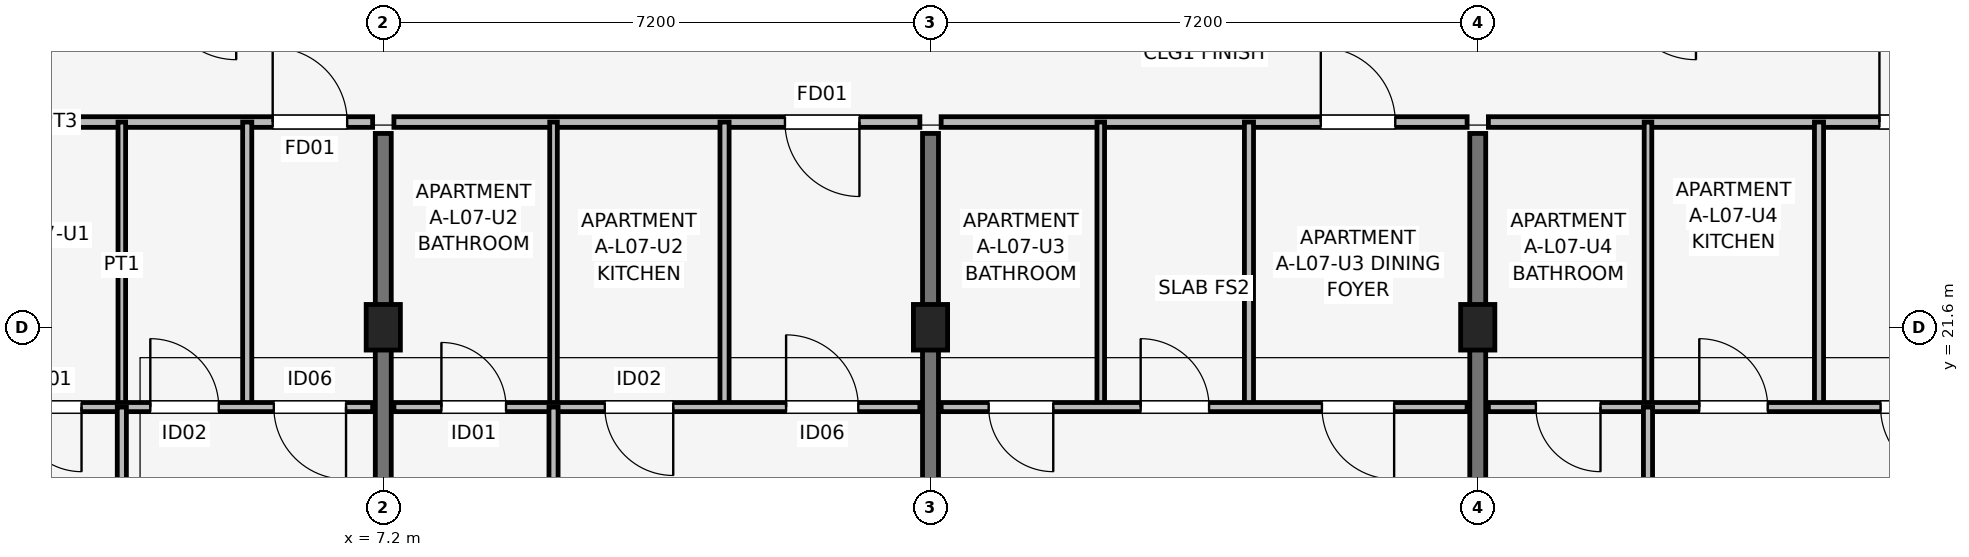
"""IFC4 building model, lengths in metres.
Left out: names, types, materials, properties, quantities, classifications, styles, units other than length and angle.
Written with IfcOpenShell. Run it as: python <this file> out.ifc"""

import sys

from ifc_helpers import new_model, si_unit, direction, frame, frame_2d, origin, origin_2d, place, context, subcontext, project, spatial, rectangle, extrude, element, fill, save


model = new_model("IFC4")
c1 = context("Model", 3, precision=1e-05, world=origin(), true_north=direction((0.0, 1.0)))
c2 = subcontext(c1, "Body", "Model", "MODEL_VIEW")
j1 = project(units=[si_unit("LENGTHUNIT", "METRE"), si_unit("PLANEANGLEUNIT", "RADIAN")], contexts=[c1])
p1 = place(None, origin())
s1 = spatial("IfcSite", under=j1, at=p1, CompositionType="ELEMENT")
p2 = place(p1, origin())
s2 = spatial("IfcBuilding", under=s1, at=p2, CompositionType="ELEMENT")
p3 = place(p2, frame((0.0, 0.0, 24.45)))
s3 = spatial("IfcBuildingStorey", under=s2, at=p3, CompositionType="ELEMENT", Elevation=24.45)
for number, where, z_axis, x_axis in (
    (1, (7.2, 21.6, 0.0), (0.0, 0.0, 1.0), (1.0, 0.0, 0.0)),
    (2, (14.4, 21.6, 0.0), (0.0, 0.0, 1.0), (1.0, 0.0, 0.0)),
    (3, (21.6, 21.6, 0.0), (0.0, 0.0, 1.0), (1.0, 0.0, 0.0)),
):
    element("IfcColumn", number, at=place(p3, frame(where, z_axis=z_axis, x_axis=x_axis)), inside=s3, PredefinedType="COLUMN", context=c2, shape_type="SweptSolid", body=[
        extrude(rectangle(XDim=0.45, YDim=0.6, at=origin_2d()), origin(), (0.0, 0.0, 1.0), 3.15),
    ])
for number, where, z_axis, x_axis in (
    (4, (7.2, 14.75, 0.0), (0.0, 0.0, 1.0), (0.0, 1.0, 0.0)),
    (5, (14.4, 14.75, 0.0), (0.0, 0.0, 1.0), (0.0, 1.0, 0.0)),
    (6, (21.6, 14.75, 0.0), (0.0, 0.0, 1.0), (0.0, 1.0, 0.0)),
):
    element("IfcWall", number, at=place(p3, frame(where, z_axis=z_axis, x_axis=x_axis)), inside=s3, PredefinedType="SHEAR", context=c2, shape_type="SweptSolid", body=[
        extrude(rectangle(XDim=9.4, YDim=0.21, at=frame_2d((4.7, 0.0))), origin(), (0.0, 0.0, 1.0), 3.15),
    ])
p4 = place(p3, frame((0.14, 24.3, 0.0), z_axis=(0.0, 0.0, 1.0), x_axis=(1.0, 0.0, 0.0)))
e7 = element("IfcWall", 7, at=p4, inside=s3, PredefinedType="PARTITIONING", context=c2, shape_type="SweptSolid", body=[
    extrude(rectangle(XDim=6.92, YDim=0.14, at=frame_2d((3.46, 0.0))), origin(), (0.0, 0.0, 1.0), 2.38),
])
p5 = place(p4, frame((5.605, 0.0, 0.0)))
e8 = element("IfcOpeningElement", 8, at=p5, cuts=e7, PredefinedType="OPENING", context=c2, shape_type="SweptSolid", body=[
    extrude(rectangle(XDim=0.98, YDim=2.1, at=frame_2d((0.49, 1.05))), frame((0.0, 0.08, 0.0), z_axis=(0.0, -1.0, 0.0), x_axis=(1.0, 0.0, 0.0)), (0.0, 0.0, 1.0), 0.16),
])
p6 = place(p3, frame((3.76, 20.55, 0.0), z_axis=(0.0, 0.0, 1.0), x_axis=(0.0, 1.0, 0.0)))
e9 = element("IfcWall", 9, at=p6, inside=s3, PredefinedType="PARTITIONING", context=c2, shape_type="SweptSolid", body=[
    extrude(rectangle(XDim=3.75, YDim=0.1, at=frame_2d((1.875, 0.0))), origin(), (0.0, 0.0, 1.0), 2.38),
])
p7 = place(p3, frame((5.41, 20.55, 0.0), z_axis=(0.0, 0.0, 1.0), x_axis=(0.0, 1.0, 0.0)))
e10 = element("IfcWall", 10, at=p7, inside=s3, PredefinedType="PARTITIONING", context=c2, shape_type="SweptSolid", body=[
    extrude(rectangle(XDim=3.75, YDim=0.12, at=frame_2d((1.875, 0.0))), origin(), (0.0, 0.0, 1.0), 2.38),
])
p8 = place(p3, frame((0.14, 20.55, 0.0), z_axis=(0.0, 0.0, 1.0), x_axis=(1.0, 0.0, 0.0)))
e11 = element("IfcWall", 11, at=p8, inside=s3, PredefinedType="PARTITIONING", context=c2, shape_type="SweptSolid", body=[
    extrude(rectangle(XDim=6.92, YDim=0.12, at=frame_2d((3.46, 0.0))), origin(), (0.0, 0.0, 1.0), 2.38),
])
p9 = place(p8, frame((3.09, 0.0, 0.0), z_axis=(0.0, 0.0, 1.0), x_axis=(-1.0, 0.0, 0.0)))
e12 = element("IfcOpeningElement", 12, at=p9, cuts=e11, PredefinedType="OPENING", context=c2, shape_type="SweptSolid", body=[
    extrude(rectangle(XDim=0.85, YDim=2.08, at=frame_2d((0.425, 1.04))), frame((0.0, 0.07, 0.0), z_axis=(0.0, -1.0, 0.0), x_axis=(1.0, 0.0, 0.0)), (0.0, 0.0, 1.0), 0.14),
])
p10 = place(p8, frame((3.995, 0.0, 0.0)))
e13 = element("IfcOpeningElement", 13, at=p10, cuts=e11, PredefinedType="OPENING", context=c2, shape_type="SweptSolid", body=[
    extrude(rectangle(XDim=0.9, YDim=2.08, at=frame_2d((0.45, 1.04))), frame((0.0, 0.07, 0.0), z_axis=(0.0, -1.0, 0.0), x_axis=(1.0, 0.0, 0.0)), (0.0, 0.0, 1.0), 0.14),
])
p11 = place(p8, frame((6.57, 0.0, 0.0), z_axis=(0.0, 0.0, 1.0), x_axis=(-1.0, 0.0, 0.0)))
e14 = element("IfcOpeningElement", 14, at=p11, cuts=e11, PredefinedType="OPENING", context=c2, shape_type="SweptSolid", body=[
    extrude(rectangle(XDim=0.95, YDim=2.08, at=frame_2d((0.475, 1.04))), frame((0.0, 0.07, 0.0), z_axis=(0.0, -1.0, 0.0), x_axis=(1.0, 0.0, 0.0)), (0.0, 0.0, 1.0), 0.14),
])
p12 = place(p3, frame((3.76, 14.7, 0.0), z_axis=(0.0, 0.0, 1.0), x_axis=(0.0, 1.0, 0.0)))
e15 = element("IfcWall", 15, at=p12, inside=s3, PredefinedType="PARTITIONING", context=c2, shape_type="SweptSolid", body=[
    extrude(rectangle(XDim=5.85, YDim=0.12, at=frame_2d((2.925, 0.0))), origin(), (0.0, 0.0, 1.0), 2.38),
])
p13 = place(p12, frame((2.475, 0.0, 0.0)))
e16 = element("IfcOpeningElement", 16, at=p13, cuts=e15, PredefinedType="OPENING", context=c2, shape_type="SweptSolid", body=[
    extrude(rectangle(XDim=0.9, YDim=2.08, at=frame_2d((0.45, 1.04))), frame((0.0, 0.07, 0.0), z_axis=(0.0, -1.0, 0.0), x_axis=(1.0, 0.0, 0.0)), (0.0, 0.0, 1.0), 0.14),
])
p14 = place(p3, frame((7.34, 24.3, 0.0), z_axis=(0.0, 0.0, 1.0), x_axis=(1.0, 0.0, 0.0)))
e17 = element("IfcWall", 17, at=p14, inside=s3, PredefinedType="PARTITIONING", context=c2, shape_type="SweptSolid", body=[
    extrude(rectangle(XDim=6.92, YDim=0.14, at=frame_2d((3.46, 0.0))), origin(), (0.0, 0.0, 1.0), 2.38),
])
p15 = place(p14, frame((6.125, 0.0, 0.0), z_axis=(0.0, 0.0, 1.0), x_axis=(-1.0, 0.0, 0.0)))
e18 = element("IfcOpeningElement", 18, at=p15, cuts=e17, PredefinedType="OPENING", context=c2, shape_type="SweptSolid", body=[
    extrude(rectangle(XDim=0.98, YDim=2.1, at=frame_2d((0.49, 1.05))), frame((0.0, 0.08, 0.0), z_axis=(0.0, -1.0, 0.0), x_axis=(1.0, 0.0, 0.0)), (0.0, 0.0, 1.0), 0.16),
])
p16 = place(p3, frame((9.44, 20.55, 0.0), z_axis=(0.0, 0.0, 1.0), x_axis=(0.0, 1.0, 0.0)))
e19 = element("IfcWall", 19, at=p16, inside=s3, PredefinedType="PARTITIONING", context=c2, shape_type="SweptSolid", body=[
    extrude(rectangle(XDim=3.75, YDim=0.1, at=frame_2d((1.875, 0.0))), origin(), (0.0, 0.0, 1.0), 2.38),
])
p17 = place(p3, frame((11.69, 20.55, 0.0), z_axis=(0.0, 0.0, 1.0), x_axis=(0.0, 1.0, 0.0)))
e20 = element("IfcWall", 20, at=p17, inside=s3, PredefinedType="PARTITIONING", context=c2, shape_type="SweptSolid", body=[
    extrude(rectangle(XDim=3.75, YDim=0.12, at=frame_2d((1.875, 0.0))), origin(), (0.0, 0.0, 1.0), 2.38),
])
p18 = place(p3, frame((7.34, 20.55, 0.0), z_axis=(0.0, 0.0, 1.0), x_axis=(1.0, 0.0, 0.0)))
e21 = element("IfcWall", 21, at=p18, inside=s3, PredefinedType="PARTITIONING", context=c2, shape_type="SweptSolid", body=[
    extrude(rectangle(XDim=6.92, YDim=0.12, at=frame_2d((3.46, 0.0))), origin(), (0.0, 0.0, 1.0), 2.38),
])
p19 = place(p18, frame((0.625, 0.0, 0.0)))
e22 = element("IfcOpeningElement", 22, at=p19, cuts=e21, PredefinedType="OPENING", context=c2, shape_type="SweptSolid", body=[
    extrude(rectangle(XDim=0.85, YDim=2.08, at=frame_2d((0.425, 1.04))), frame((0.0, 0.07, 0.0), z_axis=(0.0, -1.0, 0.0), x_axis=(1.0, 0.0, 0.0)), (0.0, 0.0, 1.0), 0.14),
])
p20 = place(p18, frame((3.675, 0.0, 0.0), z_axis=(0.0, 0.0, 1.0), x_axis=(-1.0, 0.0, 0.0)))
e23 = element("IfcOpeningElement", 23, at=p20, cuts=e21, PredefinedType="OPENING", context=c2, shape_type="SweptSolid", body=[
    extrude(rectangle(XDim=0.9, YDim=2.08, at=frame_2d((0.45, 1.04))), frame((0.0, 0.07, 0.0), z_axis=(0.0, -1.0, 0.0), x_axis=(1.0, 0.0, 0.0)), (0.0, 0.0, 1.0), 0.14),
])
p21 = place(p18, frame((5.16, 0.0, 0.0)))
e24 = element("IfcOpeningElement", 24, at=p21, cuts=e21, PredefinedType="OPENING", context=c2, shape_type="SweptSolid", body=[
    extrude(rectangle(XDim=0.95, YDim=2.08, at=frame_2d((0.475, 1.04))), frame((0.0, 0.07, 0.0), z_axis=(0.0, -1.0, 0.0), x_axis=(1.0, 0.0, 0.0)), (0.0, 0.0, 1.0), 0.14),
])
p22 = place(p3, frame((9.44, 14.7, 0.0), z_axis=(0.0, 0.0, 1.0), x_axis=(0.0, 1.0, 0.0)))
e25 = element("IfcWall", 25, at=p22, inside=s3, PredefinedType="PARTITIONING", context=c2, shape_type="SweptSolid", body=[
    extrude(rectangle(XDim=5.85, YDim=0.12, at=frame_2d((2.925, 0.0))), origin(), (0.0, 0.0, 1.0), 2.38),
])
p23 = place(p22, frame((3.375, 0.0, 0.0), z_axis=(0.0, 0.0, 1.0), x_axis=(-1.0, 0.0, 0.0)))
e26 = element("IfcOpeningElement", 26, at=p23, cuts=e25, PredefinedType="OPENING", context=c2, shape_type="SweptSolid", body=[
    extrude(rectangle(XDim=0.9, YDim=2.08, at=frame_2d((0.45, 1.04))), frame((0.0, 0.07, 0.0), z_axis=(0.0, -1.0, 0.0), x_axis=(1.0, 0.0, 0.0)), (0.0, 0.0, 1.0), 0.14),
])
p24 = place(p3, frame((14.54, 24.3, 0.0), z_axis=(0.0, 0.0, 1.0), x_axis=(1.0, 0.0, 0.0)))
e27 = element("IfcWall", 27, at=p24, inside=s3, PredefinedType="PARTITIONING", context=c2, shape_type="SweptSolid", body=[
    extrude(rectangle(XDim=6.92, YDim=0.14, at=frame_2d((3.46, 0.0))), origin(), (0.0, 0.0, 1.0), 2.38),
])
p25 = place(p24, frame((4.995, 0.0, 0.0)))
e28 = element("IfcOpeningElement", 28, at=p25, cuts=e27, PredefinedType="OPENING", context=c2, shape_type="SweptSolid", body=[
    extrude(rectangle(XDim=0.98, YDim=2.1, at=frame_2d((0.49, 1.05))), frame((0.0, 0.08, 0.0), z_axis=(0.0, -1.0, 0.0), x_axis=(1.0, 0.0, 0.0)), (0.0, 0.0, 1.0), 0.16),
])
p26 = place(p3, frame((16.64, 20.55, 0.0), z_axis=(0.0, 0.0, 1.0), x_axis=(0.0, 1.0, 0.0)))
e29 = element("IfcWall", 29, at=p26, inside=s3, PredefinedType="PARTITIONING", context=c2, shape_type="SweptSolid", body=[
    extrude(rectangle(XDim=3.75, YDim=0.1, at=frame_2d((1.875, 0.0))), origin(), (0.0, 0.0, 1.0), 2.38),
])
p27 = place(p3, frame((18.59, 20.55, 0.0), z_axis=(0.0, 0.0, 1.0), x_axis=(0.0, 1.0, 0.0)))
e30 = element("IfcWall", 30, at=p27, inside=s3, PredefinedType="PARTITIONING", context=c2, shape_type="SweptSolid", body=[
    extrude(rectangle(XDim=3.75, YDim=0.12, at=frame_2d((1.875, 0.0))), origin(), (0.0, 0.0, 1.0), 2.38),
])
p28 = place(p3, frame((14.54, 20.55, 0.0), z_axis=(0.0, 0.0, 1.0), x_axis=(1.0, 0.0, 0.0)))
e31 = element("IfcWall", 31, at=p28, inside=s3, PredefinedType="PARTITIONING", context=c2, shape_type="SweptSolid", body=[
    extrude(rectangle(XDim=6.92, YDim=0.12, at=frame_2d((3.46, 0.0))), origin(), (0.0, 0.0, 1.0), 2.38),
])
p29 = place(p28, frame((1.475, 0.0, 0.0), z_axis=(0.0, 0.0, 1.0), x_axis=(-1.0, 0.0, 0.0)))
e32 = element("IfcOpeningElement", 32, at=p29, cuts=e31, PredefinedType="OPENING", context=c2, shape_type="SweptSolid", body=[
    extrude(rectangle(XDim=0.85, YDim=2.08, at=frame_2d((0.425, 1.04))), frame((0.0, 0.07, 0.0), z_axis=(0.0, -1.0, 0.0), x_axis=(1.0, 0.0, 0.0)), (0.0, 0.0, 1.0), 0.14),
])
p30 = place(p28, frame((2.625, 0.0, 0.0)))
e33 = element("IfcOpeningElement", 33, at=p30, cuts=e31, PredefinedType="OPENING", context=c2, shape_type="SweptSolid", body=[
    extrude(rectangle(XDim=0.9, YDim=2.08, at=frame_2d((0.45, 1.04))), frame((0.0, 0.07, 0.0), z_axis=(0.0, -1.0, 0.0), x_axis=(1.0, 0.0, 0.0)), (0.0, 0.0, 1.0), 0.14),
])
p31 = place(p28, frame((5.96, 0.0, 0.0), z_axis=(0.0, 0.0, 1.0), x_axis=(-1.0, 0.0, 0.0)))
e34 = element("IfcOpeningElement", 34, at=p31, cuts=e31, PredefinedType="OPENING", context=c2, shape_type="SweptSolid", body=[
    extrude(rectangle(XDim=0.95, YDim=2.08, at=frame_2d((0.475, 1.04))), frame((0.0, 0.07, 0.0), z_axis=(0.0, -1.0, 0.0), x_axis=(1.0, 0.0, 0.0)), (0.0, 0.0, 1.0), 0.14),
])
p32 = place(p3, frame((21.74, 24.3, 0.0), z_axis=(0.0, 0.0, 1.0), x_axis=(1.0, 0.0, 0.0)))
e35 = element("IfcWall", 35, at=p32, inside=s3, PredefinedType="PARTITIONING", context=c2, shape_type="SweptSolid", body=[
    extrude(rectangle(XDim=6.92, YDim=0.14, at=frame_2d((3.46, 0.0))), origin(), (0.0, 0.0, 1.0), 2.38),
])
p33 = place(p32, frame((5.145, 0.0, 0.0)))
e36 = element("IfcOpeningElement", 36, at=p33, cuts=e35, PredefinedType="OPENING", context=c2, shape_type="SweptSolid", body=[
    extrude(rectangle(XDim=0.98, YDim=2.1, at=frame_2d((0.49, 1.05))), frame((0.0, 0.08, 0.0), z_axis=(0.0, -1.0, 0.0), x_axis=(1.0, 0.0, 0.0)), (0.0, 0.0, 1.0), 0.16),
])
p34 = place(p3, frame((23.84, 20.55, 0.0), z_axis=(0.0, 0.0, 1.0), x_axis=(0.0, 1.0, 0.0)))
e37 = element("IfcWall", 37, at=p34, inside=s3, PredefinedType="PARTITIONING", context=c2, shape_type="SweptSolid", body=[
    extrude(rectangle(XDim=3.75, YDim=0.1, at=frame_2d((1.875, 0.0))), origin(), (0.0, 0.0, 1.0), 2.38),
])
p35 = place(p3, frame((26.09, 20.55, 0.0), z_axis=(0.0, 0.0, 1.0), x_axis=(0.0, 1.0, 0.0)))
e38 = element("IfcWall", 38, at=p35, inside=s3, PredefinedType="PARTITIONING", context=c2, shape_type="SweptSolid", body=[
    extrude(rectangle(XDim=3.75, YDim=0.12, at=frame_2d((1.875, 0.0))), origin(), (0.0, 0.0, 1.0), 2.38),
])
p36 = place(p3, frame((21.74, 20.55, 0.0), z_axis=(0.0, 0.0, 1.0), x_axis=(1.0, 0.0, 0.0)))
e39 = element("IfcWall", 39, at=p36, inside=s3, PredefinedType="PARTITIONING", context=c2, shape_type="SweptSolid", body=[
    extrude(rectangle(XDim=6.92, YDim=0.12, at=frame_2d((3.46, 0.0))), origin(), (0.0, 0.0, 1.0), 2.38),
])
p37 = place(p36, frame((1.475, 0.0, 0.0), z_axis=(0.0, 0.0, 1.0), x_axis=(-1.0, 0.0, 0.0)))
e40 = element("IfcOpeningElement", 40, at=p37, cuts=e39, PredefinedType="OPENING", context=c2, shape_type="SweptSolid", body=[
    extrude(rectangle(XDim=0.85, YDim=2.08, at=frame_2d((0.425, 1.04))), frame((0.0, 0.07, 0.0), z_axis=(0.0, -1.0, 0.0), x_axis=(1.0, 0.0, 0.0)), (0.0, 0.0, 1.0), 0.14),
])
p38 = place(p36, frame((2.775, 0.0, 0.0)))
e41 = element("IfcOpeningElement", 41, at=p38, cuts=e39, PredefinedType="OPENING", context=c2, shape_type="SweptSolid", body=[
    extrude(rectangle(XDim=0.9, YDim=2.08, at=frame_2d((0.45, 1.04))), frame((0.0, 0.07, 0.0), z_axis=(0.0, -1.0, 0.0), x_axis=(1.0, 0.0, 0.0)), (0.0, 0.0, 1.0), 0.14),
])
p39 = place(p36, frame((6.11, 0.0, 0.0), z_axis=(0.0, 0.0, 1.0), x_axis=(-1.0, 0.0, 0.0)))
e42 = element("IfcOpeningElement", 42, at=p39, cuts=e39, PredefinedType="OPENING", context=c2, shape_type="SweptSolid", body=[
    extrude(rectangle(XDim=0.95, YDim=2.08, at=frame_2d((0.475, 1.04))), frame((0.0, 0.07, 0.0), z_axis=(0.0, -1.0, 0.0), x_axis=(1.0, 0.0, 0.0)), (0.0, 0.0, 1.0), 0.14),
])
p40 = place(p3, frame((23.84, 14.7, 0.0), z_axis=(0.0, 0.0, 1.0), x_axis=(0.0, 1.0, 0.0)))
e43 = element("IfcWall", 43, at=p40, inside=s3, PredefinedType="PARTITIONING", context=c2, shape_type="SweptSolid", body=[
    extrude(rectangle(XDim=5.85, YDim=0.12, at=frame_2d((2.925, 0.0))), origin(), (0.0, 0.0, 1.0), 2.38),
])
p41 = place(p40, frame((2.475, 0.0, 0.0)))
e44 = element("IfcOpeningElement", 44, at=p41, cuts=e43, PredefinedType="OPENING", context=c2, shape_type="SweptSolid", body=[
    extrude(rectangle(XDim=0.9, YDim=2.08, at=frame_2d((0.45, 1.04))), frame((0.0, 0.07, 0.0), z_axis=(0.0, -1.0, 0.0), x_axis=(1.0, 0.0, 0.0)), (0.0, 0.0, 1.0), 0.14),
])
p42 = place(p5, origin())
e45 = element("IfcDoor", 45, at=p42, inside=s3, OperationType="SINGLE_SWING_LEFT", PredefinedType="DOOR", context=c2, shape_type="SweptSolid", body=[
    extrude(rectangle(XDim=0.98, YDim=2.1, at=frame_2d((0.49, 1.05))), frame((0.0, 0.025, 0.0), z_axis=(0.0, -1.0, 0.0), x_axis=(1.0, 0.0, 0.0)), (0.0, 0.0, 1.0), 0.05),
])
fill(e8, e45)
p43 = place(p9, origin())
e46 = element("IfcDoor", 46, at=p43, inside=s3, OperationType="SINGLE_SWING_RIGHT", PredefinedType="DOOR", context=c2, shape_type="SweptSolid", body=[
    extrude(rectangle(XDim=0.85, YDim=2.08, at=frame_2d((0.425, 1.04))), frame((0.0, 0.025, 0.0), z_axis=(0.0, -1.0, 0.0), x_axis=(1.0, 0.0, 0.0)), (0.0, 0.0, 1.0), 0.05),
])
fill(e12, e46)
p44 = place(p10, origin())
e47 = element("IfcDoor", 47, at=p44, inside=s3, OperationType="SINGLE_SWING_LEFT", PredefinedType="DOOR", context=c2, shape_type="SweptSolid", body=[
    extrude(rectangle(XDim=0.9, YDim=2.08, at=frame_2d((0.45, 1.04))), frame((0.0, 0.025, 0.0), z_axis=(0.0, -1.0, 0.0), x_axis=(1.0, 0.0, 0.0)), (0.0, 0.0, 1.0), 0.05),
])
fill(e13, e47)
p45 = place(p11, origin())
e48 = element("IfcDoor", 48, at=p45, inside=s3, OperationType="SINGLE_SWING_RIGHT", PredefinedType="DOOR", context=c2, shape_type="SweptSolid", body=[
    extrude(rectangle(XDim=0.95, YDim=2.08, at=frame_2d((0.475, 1.04))), frame((0.0, 0.025, 0.0), z_axis=(0.0, -1.0, 0.0), x_axis=(1.0, 0.0, 0.0)), (0.0, 0.0, 1.0), 0.05),
])
fill(e14, e48)
p46 = place(p15, origin())
e49 = element("IfcDoor", 49, at=p46, inside=s3, OperationType="SINGLE_SWING_RIGHT", PredefinedType="DOOR", context=c2, shape_type="SweptSolid", body=[
    extrude(rectangle(XDim=0.98, YDim=2.1, at=frame_2d((0.49, 1.05))), frame((0.0, 0.025, 0.0), z_axis=(0.0, -1.0, 0.0), x_axis=(1.0, 0.0, 0.0)), (0.0, 0.0, 1.0), 0.05),
])
fill(e18, e49)
p47 = place(p19, origin())
e50 = element("IfcDoor", 50, at=p47, inside=s3, OperationType="SINGLE_SWING_LEFT", PredefinedType="DOOR", context=c2, shape_type="SweptSolid", body=[
    extrude(rectangle(XDim=0.85, YDim=2.08, at=frame_2d((0.425, 1.04))), frame((0.0, 0.025, 0.0), z_axis=(0.0, -1.0, 0.0), x_axis=(1.0, 0.0, 0.0)), (0.0, 0.0, 1.0), 0.05),
])
fill(e22, e50)
p48 = place(p20, origin())
e51 = element("IfcDoor", 51, at=p48, inside=s3, OperationType="SINGLE_SWING_RIGHT", PredefinedType="DOOR", context=c2, shape_type="SweptSolid", body=[
    extrude(rectangle(XDim=0.9, YDim=2.08, at=frame_2d((0.45, 1.04))), frame((0.0, 0.025, 0.0), z_axis=(0.0, -1.0, 0.0), x_axis=(1.0, 0.0, 0.0)), (0.0, 0.0, 1.0), 0.05),
])
fill(e23, e51)
p49 = place(p21, origin())
e52 = element("IfcDoor", 52, at=p49, inside=s3, OperationType="SINGLE_SWING_LEFT", PredefinedType="DOOR", context=c2, shape_type="SweptSolid", body=[
    extrude(rectangle(XDim=0.95, YDim=2.08, at=frame_2d((0.475, 1.04))), frame((0.0, 0.025, 0.0), z_axis=(0.0, -1.0, 0.0), x_axis=(1.0, 0.0, 0.0)), (0.0, 0.0, 1.0), 0.05),
])
fill(e24, e52)
p50 = place(p25, origin())
e53 = element("IfcDoor", 53, at=p50, inside=s3, OperationType="SINGLE_SWING_LEFT", PredefinedType="DOOR", context=c2, shape_type="SweptSolid", body=[
    extrude(rectangle(XDim=0.98, YDim=2.1, at=frame_2d((0.49, 1.05))), frame((0.0, 0.025, 0.0), z_axis=(0.0, -1.0, 0.0), x_axis=(1.0, 0.0, 0.0)), (0.0, 0.0, 1.0), 0.05),
])
fill(e28, e53)
p51 = place(p29, origin())
e54 = element("IfcDoor", 54, at=p51, inside=s3, OperationType="SINGLE_SWING_RIGHT", PredefinedType="DOOR", context=c2, shape_type="SweptSolid", body=[
    extrude(rectangle(XDim=0.85, YDim=2.08, at=frame_2d((0.425, 1.04))), frame((0.0, 0.025, 0.0), z_axis=(0.0, -1.0, 0.0), x_axis=(1.0, 0.0, 0.0)), (0.0, 0.0, 1.0), 0.05),
])
fill(e32, e54)
p52 = place(p30, origin())
e55 = element("IfcDoor", 55, at=p52, inside=s3, OperationType="SINGLE_SWING_LEFT", PredefinedType="DOOR", context=c2, shape_type="SweptSolid", body=[
    extrude(rectangle(XDim=0.9, YDim=2.08, at=frame_2d((0.45, 1.04))), frame((0.0, 0.025, 0.0), z_axis=(0.0, -1.0, 0.0), x_axis=(1.0, 0.0, 0.0)), (0.0, 0.0, 1.0), 0.05),
])
fill(e33, e55)
p53 = place(p31, origin())
e56 = element("IfcDoor", 56, at=p53, inside=s3, OperationType="SINGLE_SWING_RIGHT", PredefinedType="DOOR", context=c2, shape_type="SweptSolid", body=[
    extrude(rectangle(XDim=0.95, YDim=2.08, at=frame_2d((0.475, 1.04))), frame((0.0, 0.025, 0.0), z_axis=(0.0, -1.0, 0.0), x_axis=(1.0, 0.0, 0.0)), (0.0, 0.0, 1.0), 0.05),
])
fill(e34, e56)
p54 = place(p33, origin())
e57 = element("IfcDoor", 57, at=p54, inside=s3, OperationType="SINGLE_SWING_LEFT", PredefinedType="DOOR", context=c2, shape_type="SweptSolid", body=[
    extrude(rectangle(XDim=0.98, YDim=2.1, at=frame_2d((0.49, 1.05))), frame((0.0, 0.025, 0.0), z_axis=(0.0, -1.0, 0.0), x_axis=(1.0, 0.0, 0.0)), (0.0, 0.0, 1.0), 0.05),
])
fill(e36, e57)
p55 = place(p37, origin())
e58 = element("IfcDoor", 58, at=p55, inside=s3, OperationType="SINGLE_SWING_RIGHT", PredefinedType="DOOR", context=c2, shape_type="SweptSolid", body=[
    extrude(rectangle(XDim=0.85, YDim=2.08, at=frame_2d((0.425, 1.04))), frame((0.0, 0.025, 0.0), z_axis=(0.0, -1.0, 0.0), x_axis=(1.0, 0.0, 0.0)), (0.0, 0.0, 1.0), 0.05),
])
fill(e40, e58)
p56 = place(p38, origin())
e59 = element("IfcDoor", 59, at=p56, inside=s3, OperationType="SINGLE_SWING_LEFT", PredefinedType="DOOR", context=c2, shape_type="SweptSolid", body=[
    extrude(rectangle(XDim=0.9, YDim=2.08, at=frame_2d((0.45, 1.04))), frame((0.0, 0.025, 0.0), z_axis=(0.0, -1.0, 0.0), x_axis=(1.0, 0.0, 0.0)), (0.0, 0.0, 1.0), 0.05),
])
fill(e41, e59)
p57 = place(p39, origin())
e60 = element("IfcDoor", 60, at=p57, inside=s3, OperationType="SINGLE_SWING_RIGHT", PredefinedType="DOOR", context=c2, shape_type="SweptSolid", body=[
    extrude(rectangle(XDim=0.95, YDim=2.08, at=frame_2d((0.475, 1.04))), frame((0.0, 0.025, 0.0), z_axis=(0.0, -1.0, 0.0), x_axis=(1.0, 0.0, 0.0)), (0.0, 0.0, 1.0), 0.05),
])
fill(e42, e60)
save(model, sys.argv[1])
